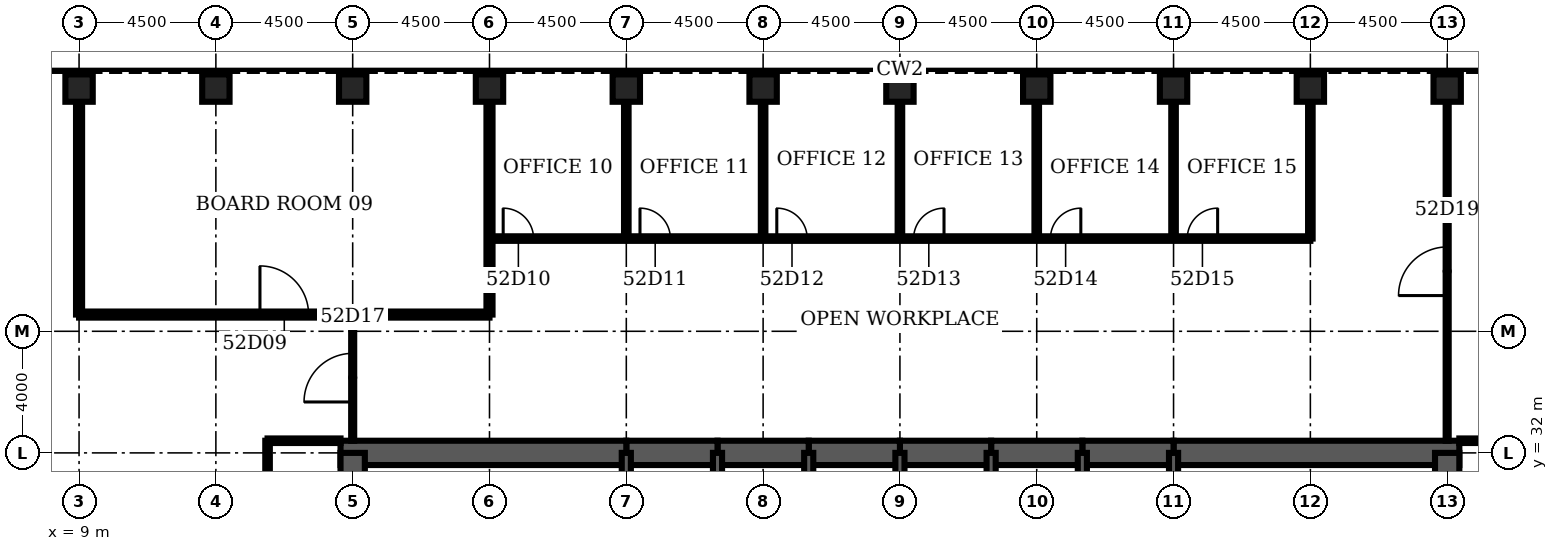
"""IFC4 building model, lengths in metres.
Left out: names, types, materials, properties, quantities, classifications, styles, units other than length and angle.
Written with IfcOpenShell. Run it as: python <this file> out.ifc"""

import sys

from ifc_helpers import new_model, si_unit, direction, frame, frame_2d, origin, origin_2d, place, context, subcontext, project, spatial, rectangle, hollow_rectangle, extrude, element, fill, save


model = new_model("IFC4")
c1 = context("Model", 3, precision=1e-05, world=origin(), true_north=direction((0.0, 1.0)))
c2 = subcontext(c1, "Body", "Model", "MODEL_VIEW")
j1 = project(units=[si_unit("LENGTHUNIT", "METRE"), si_unit("PLANEANGLEUNIT", "RADIAN")], contexts=[c1])
p1 = place(None, origin())
s1 = spatial("IfcSite", under=j1, at=p1, CompositionType="ELEMENT")
p2 = place(p1, origin())
s2 = spatial("IfcBuilding", under=s1, at=p2, CompositionType="ELEMENT")
p3 = place(p2, frame((0.0, 0.0, 232.0)))
s3 = spatial("IfcBuildingStorey", under=s2, at=p3, CompositionType="ELEMENT", Elevation=232.0)
for number, where, z_axis, x_axis in (
    (1, (54.0, 44.0, 0.0), (0.0, 0.0, 1.0), (0.0, 1.0, 0.0)),
    (2, (49.5, 44.0, 0.0), (0.0, 0.0, 1.0), (0.0, 1.0, 0.0)),
    (3, (45.0, 44.0, 0.0), (0.0, 0.0, 1.0), (0.0, 1.0, 0.0)),
    (4, (40.5, 44.0, 0.0), (0.0, 0.0, 1.0), (0.0, 1.0, 0.0)),
    (5, (36.0, 44.0, 0.0), (0.0, 0.0, 1.0), (0.0, 1.0, 0.0)),
    (6, (31.5, 44.0, 0.0), (0.0, 0.0, 1.0), (0.0, 1.0, 0.0)),
    (7, (27.0, 44.0, 0.0), (0.0, 0.0, 1.0), (0.0, 1.0, 0.0)),
    (8, (22.5, 44.0, 0.0), (0.0, 0.0, 1.0), (0.0, 1.0, 0.0)),
    (9, (18.0, 44.0, 0.0), (0.0, 0.0, 1.0), (0.0, 1.0, 0.0)),
    (10, (13.5, 44.0, 0.0), (0.0, 0.0, 1.0), (0.0, 1.0, 0.0)),
    (11, (9.0, 44.0, 0.0), (0.0, 0.0, 1.0), (0.0, 1.0, 0.0)),
):
    element("IfcColumn", number, at=place(p3, frame(where, z_axis=z_axis, x_axis=x_axis)), inside=s3, PredefinedType="COLUMN", context=c2, shape_type="SweptSolid", body=[
        extrude(hollow_rectangle(XDim=0.9, YDim=0.9, WallThickness=0.08, at=origin_2d()), origin(), (0.0, 0.0, 1.0), 4.2),
    ])
p4 = place(p3, frame((54.4, 32.0, 0.0), z_axis=(0.0, 0.0, 1.0), x_axis=(-1.0, 0.0, 0.0)))
e12 = element("IfcWall", 12, at=p4, inside=s3, PredefinedType="SHEAR", context=c2, shape_type="SweptSolid", body=[
    extrude(rectangle(XDim=9.4, YDim=0.8, at=frame_2d((4.7, 0.0))), origin(), (0.0, 0.0, 1.0), 4.2),
])
for number, where, z_axis, x_axis in (
    (13, (45.0, 32.0, 0.0), (0.0, 0.0, 1.0), (-1.0, 0.0, 0.0)),
    (14, (42.0, 32.0, 0.0), (0.0, 0.0, 1.0), (-1.0, 0.0, 0.0)),
    (15, (39.0, 32.0, 0.0), (0.0, 0.0, 1.0), (-1.0, 0.0, 0.0)),
    (16, (36.0, 32.0, 0.0), (0.0, 0.0, 1.0), (-1.0, 0.0, 0.0)),
    (17, (33.0, 32.0, 0.0), (0.0, 0.0, 1.0), (-1.0, 0.0, 0.0)),
    (18, (30.0, 32.0, 0.0), (0.0, 0.0, 1.0), (-1.0, 0.0, 0.0)),
):
    element("IfcWall", number, at=place(p3, frame(where, z_axis=z_axis, x_axis=x_axis)), inside=s3, PredefinedType="SHEAR", context=c2, shape_type="SweptSolid", body=[
        extrude(rectangle(XDim=3.0, YDim=0.8, at=frame_2d((1.5, 0.0))), origin(), (0.0, 0.0, 1.0), 4.2),
    ])
p5 = place(p3, frame((27.0, 32.0, 0.0), z_axis=(0.0, 0.0, 1.0), x_axis=(-1.0, 0.0, 0.0)))
e19 = element("IfcWall", 19, at=p5, inside=s3, PredefinedType="SHEAR", context=c2, shape_type="SweptSolid", body=[
    extrude(rectangle(XDim=9.4, YDim=0.8, at=frame_2d((4.7, 0.0))), origin(), (0.0, 0.0, 1.0), 4.2),
])
for number, where, z_axis, x_axis in (
    (20, (18.0, 32.0, 0.0), (0.0, 0.0, 1.0), (0.0, -1.0, 0.0)),
    (21, (54.0, 28.8, 0.0), (0.0, 0.0, 1.0), (0.0, 1.0, 0.0)),
):
    element("IfcWall", number, at=place(p3, frame(where, z_axis=z_axis, x_axis=x_axis)), inside=s3, PredefinedType="SHEAR", context=c2, shape_type="SweptSolid", body=[
        extrude(rectangle(XDim=3.2, YDim=0.8, at=frame_2d((1.6, 0.0))), origin(), (0.0, 0.0, 1.0), 4.2),
    ])
for number, where, z_axis, x_axis in (
    (22, (27.0, 28.8, 0.0), (0.0, 0.0, 1.0), (0.0, 1.0, 0.0)),
    (23, (30.0, 28.8, 0.0), (0.0, 0.0, 1.0), (0.0, 1.0, 0.0)),
    (24, (33.0, 28.8, 0.0), (0.0, 0.0, 1.0), (0.0, 1.0, 0.0)),
    (25, (36.0, 28.8, 0.0), (0.0, 0.0, 1.0), (0.0, 1.0, 0.0)),
    (26, (39.0, 28.8, 0.0), (0.0, 0.0, 1.0), (0.0, 1.0, 0.0)),
    (27, (42.0, 28.8, 0.0), (0.0, 0.0, 1.0), (0.0, 1.0, 0.0)),
    (28, (45.0, 28.8, 0.0), (0.0, 0.0, 1.0), (0.0, 1.0, 0.0)),
):
    element("IfcWall", number, at=place(p3, frame(where, z_axis=z_axis, x_axis=x_axis)), inside=s3, PredefinedType="SOLIDWALL", context=c2, shape_type="SweptSolid", body=[
        extrude(rectangle(XDim=3.2, YDim=0.3, at=frame_2d((1.6, 0.0))), origin(), (0.0, 0.0, 1.0), 4.2),
    ])
for number, where, z_axis, x_axis in (
    (29, (15.2, 32.4, 0.0), (0.0, 0.0, 1.0), (1.0, 0.0, 0.0)),
    (30, (54.4, 32.4, 0.0), (0.0, 0.0, 1.0), (1.0, 0.0, 0.0)),
):
    element("IfcWall", number, at=place(p3, frame(where, z_axis=z_axis, x_axis=x_axis)), inside=s3, PredefinedType="PARTITIONING", context=c2, shape_type="SweptSolid", body=[
        extrude(rectangle(XDim=2.4, YDim=0.15, at=frame_2d((1.2, 0.0))), origin(), (0.0, 0.0, 1.0), 3.0),
    ])
p6 = place(p3, frame((9.0, 36.55, 0.0), z_axis=(0.0, 0.0, 1.0), x_axis=(1.0, 0.0, 0.0)))
e31 = element("IfcWall", 31, at=p6, inside=s3, PredefinedType="PARTITIONING", context=c2, shape_type="SweptSolid", body=[
    extrude(rectangle(XDim=13.5, YDim=0.2, at=frame_2d((6.75, 0.0))), origin(), (0.0, 0.0, 1.0), 3.0),
])
p7 = place(p6, frame((5.95, 0.0, 0.0)))
e32 = element("IfcOpeningElement", 32, at=p7, cuts=e31, PredefinedType="OPENING", context=c2, shape_type="SweptSolid", body=[
    extrude(rectangle(XDim=1.6, YDim=2.1, at=frame_2d((0.8, 1.05))), frame((0.0, 0.11, 0.0), z_axis=(0.0, -1.0, 0.0), x_axis=(1.0, 0.0, 0.0)), (0.0, 0.0, 1.0), 0.22),
])
p8 = place(p3, frame((22.5, 39.05, 0.0), z_axis=(0.0, 0.0, 1.0), x_axis=(1.0, 0.0, 0.0)))
e33 = element("IfcWall", 33, at=p8, inside=s3, PredefinedType="PARTITIONING", context=c2, shape_type="SweptSolid", body=[
    extrude(rectangle(XDim=27.0, YDim=0.15, at=frame_2d((13.5, 0.0))), origin(), (0.0, 0.0, 1.0), 3.0),
])
p9 = place(p8, frame((0.45, 0.0, 0.0)))
e34 = element("IfcOpeningElement", 34, at=p9, cuts=e33, PredefinedType="OPENING", context=c2, shape_type="SweptSolid", body=[
    extrude(rectangle(XDim=1.0, YDim=2.1, at=frame_2d((0.5, 1.05))), frame((0.0, 0.085, 0.0), z_axis=(0.0, -1.0, 0.0), x_axis=(1.0, 0.0, 0.0)), (0.0, 0.0, 1.0), 0.17),
])
p10 = place(p8, frame((4.95, 0.0, 0.0)))
e35 = element("IfcOpeningElement", 35, at=p10, cuts=e33, PredefinedType="OPENING", context=c2, shape_type="SweptSolid", body=[
    extrude(rectangle(XDim=1.0, YDim=2.1, at=frame_2d((0.5, 1.05))), frame((0.0, 0.085, 0.0), z_axis=(0.0, -1.0, 0.0), x_axis=(1.0, 0.0, 0.0)), (0.0, 0.0, 1.0), 0.17),
])
p11 = place(p8, frame((9.45, 0.0, 0.0)))
e36 = element("IfcOpeningElement", 36, at=p11, cuts=e33, PredefinedType="OPENING", context=c2, shape_type="SweptSolid", body=[
    extrude(rectangle(XDim=1.0, YDim=2.1, at=frame_2d((0.5, 1.05))), frame((0.0, 0.085, 0.0), z_axis=(0.0, -1.0, 0.0), x_axis=(1.0, 0.0, 0.0)), (0.0, 0.0, 1.0), 0.17),
])
p12 = place(p8, frame((13.95, 0.0, 0.0)))
e37 = element("IfcOpeningElement", 37, at=p12, cuts=e33, PredefinedType="OPENING", context=c2, shape_type="SweptSolid", body=[
    extrude(rectangle(XDim=1.0, YDim=2.1, at=frame_2d((0.5, 1.05))), frame((0.0, 0.085, 0.0), z_axis=(0.0, -1.0, 0.0), x_axis=(1.0, 0.0, 0.0)), (0.0, 0.0, 1.0), 0.17),
])
p13 = place(p8, frame((18.45, 0.0, 0.0)))
e38 = element("IfcOpeningElement", 38, at=p13, cuts=e33, PredefinedType="OPENING", context=c2, shape_type="SweptSolid", body=[
    extrude(rectangle(XDim=1.0, YDim=2.1, at=frame_2d((0.5, 1.05))), frame((0.0, 0.085, 0.0), z_axis=(0.0, -1.0, 0.0), x_axis=(1.0, 0.0, 0.0)), (0.0, 0.0, 1.0), 0.17),
])
p14 = place(p8, frame((22.95, 0.0, 0.0)))
e39 = element("IfcOpeningElement", 39, at=p14, cuts=e33, PredefinedType="OPENING", context=c2, shape_type="SweptSolid", body=[
    extrude(rectangle(XDim=1.0, YDim=2.1, at=frame_2d((0.5, 1.05))), frame((0.0, 0.085, 0.0), z_axis=(0.0, -1.0, 0.0), x_axis=(1.0, 0.0, 0.0)), (0.0, 0.0, 1.0), 0.17),
])
p15 = place(p3, frame((9.0, 36.55, 0.0), z_axis=(0.0, 0.0, 1.0), x_axis=(0.0, 1.0, 0.0)))
e40 = element("IfcWall", 40, at=p15, inside=s3, PredefinedType="PARTITIONING", context=c2, shape_type="SweptSolid", body=[
    extrude(rectangle(XDim=7.0, YDim=0.2, at=frame_2d((3.5, 0.0))), origin(), (0.0, 0.0, 1.0), 3.0),
])
p16 = place(p3, frame((15.2, 13.8, 0.0), z_axis=(0.0, 0.0, 1.0), x_axis=(0.0, 1.0, 0.0)))
e41 = element("IfcWall", 41, at=p16, inside=s3, PredefinedType="PARTITIONING", context=c2, shape_type="SweptSolid", body=[
    extrude(rectangle(XDim=18.6, YDim=0.15, at=frame_2d((9.3, 0.0))), origin(), (0.0, 0.0, 1.0), 3.0),
])
p17 = place(p16, frame((8.7, 0.0, 0.0)))
e42 = element("IfcOpeningElement", 42, at=p17, cuts=e41, PredefinedType="OPENING", context=c2, shape_type="SweptSolid", body=[
    extrude(rectangle(XDim=1.2, YDim=2.1, at=frame_2d((0.6, 1.05))), frame((0.0, 0.085, 0.0), z_axis=(0.0, -1.0, 0.0), x_axis=(1.0, 0.0, 0.0)), (0.0, 0.0, 1.0), 0.17),
])
p18 = place(p3, frame((18.0, 32.4, 0.0), z_axis=(0.0, 0.0, 1.0), x_axis=(0.0, 1.0, 0.0)))
e43 = element("IfcWall", 43, at=p18, inside=s3, PredefinedType="PARTITIONING", context=c2, shape_type="SweptSolid", body=[
    extrude(rectangle(XDim=4.15, YDim=0.1, at=frame_2d((2.075, 0.0))), origin(), (0.0, 0.0, 1.0), 3.0),
])
p19 = place(p18, frame((1.275, 0.0, 0.0)))
e44 = element("IfcOpeningElement", 44, at=p19, cuts=e43, PredefinedType="OPENING", context=c2, shape_type="SweptSolid", body=[
    extrude(rectangle(XDim=1.6, YDim=2.1, at=frame_2d((0.8, 1.05))), frame((0.0, 0.06, 0.0), z_axis=(0.0, -1.0, 0.0), x_axis=(1.0, 0.0, 0.0)), (0.0, 0.0, 1.0), 0.12),
])
p20 = place(p3, frame((22.5, 36.55, 0.0), z_axis=(0.0, 0.0, 1.0), x_axis=(0.0, 1.0, 0.0)))
e45 = element("IfcWall", 45, at=p20, inside=s3, PredefinedType="PARTITIONING", context=c2, shape_type="SweptSolid", body=[
    extrude(rectangle(XDim=7.0, YDim=0.2, at=frame_2d((3.5, 0.0))), origin(), (0.0, 0.0, 1.0), 3.0),
])
for number, where, z_axis, x_axis in (
    (46, (27.0, 39.05, 0.0), (0.0, 0.0, 1.0), (0.0, 1.0, 0.0)),
    (47, (31.5, 39.05, 0.0), (0.0, 0.0, 1.0), (0.0, 1.0, 0.0)),
    (48, (36.0, 39.05, 0.0), (0.0, 0.0, 1.0), (0.0, 1.0, 0.0)),
    (49, (40.5, 39.05, 0.0), (0.0, 0.0, 1.0), (0.0, 1.0, 0.0)),
    (50, (45.0, 39.05, 0.0), (0.0, 0.0, 1.0), (0.0, 1.0, 0.0)),
    (51, (49.5, 39.05, 0.0), (0.0, 0.0, 1.0), (0.0, 1.0, 0.0)),
):
    element("IfcWall", number, at=place(p3, frame(where, z_axis=z_axis, x_axis=x_axis)), inside=s3, PredefinedType="PARTITIONING", context=c2, shape_type="SweptSolid", body=[
        extrude(rectangle(XDim=4.5, YDim=0.15, at=frame_2d((2.25, 0.0))), origin(), (0.0, 0.0, 1.0), 3.0),
    ])
p21 = place(p3, frame((54.0, 32.4, 0.0), z_axis=(0.0, 0.0, 1.0), x_axis=(0.0, 1.0, 0.0)))
e52 = element("IfcWall", 52, at=p21, inside=s3, PredefinedType="PARTITIONING", context=c2, shape_type="SweptSolid", body=[
    extrude(rectangle(XDim=11.15, YDim=0.1, at=frame_2d((5.575, 0.0))), origin(), (0.0, 0.0, 1.0), 3.0),
])
p22 = place(p21, frame((4.775, 0.0, 0.0)))
e53 = element("IfcOpeningElement", 53, at=p22, cuts=e52, PredefinedType="OPENING", context=c2, shape_type="SweptSolid", body=[
    extrude(rectangle(XDim=1.6, YDim=2.1, at=frame_2d((0.8, 1.05))), frame((0.0, 0.06, 0.0), z_axis=(0.0, -1.0, 0.0), x_axis=(1.0, 0.0, 0.0)), (0.0, 0.0, 1.0), 0.12),
])
p23 = place(p7, origin())
e54 = element("IfcDoor", 54, at=p23, inside=s3, OperationType="SINGLE_SWING_LEFT", PredefinedType="DOOR", context=c2, shape_type="SweptSolid", body=[
    extrude(rectangle(XDim=1.6, YDim=2.1, at=frame_2d((0.8, 1.05))), frame((0.0, 0.025, 0.0), z_axis=(0.0, -1.0, 0.0), x_axis=(1.0, 0.0, 0.0)), (0.0, 0.0, 1.0), 0.05),
])
fill(e32, e54)
p24 = place(p9, origin())
e55 = element("IfcDoor", 55, at=p24, inside=s3, OperationType="SINGLE_SWING_LEFT", PredefinedType="DOOR", context=c2, shape_type="SweptSolid", body=[
    extrude(rectangle(XDim=1.0, YDim=2.1, at=frame_2d((0.5, 1.05))), frame((0.0, 0.025, 0.0), z_axis=(0.0, -1.0, 0.0), x_axis=(1.0, 0.0, 0.0)), (0.0, 0.0, 1.0), 0.05),
])
fill(e34, e55)
p25 = place(p10, origin())
e56 = element("IfcDoor", 56, at=p25, inside=s3, OperationType="SINGLE_SWING_LEFT", PredefinedType="DOOR", context=c2, shape_type="SweptSolid", body=[
    extrude(rectangle(XDim=1.0, YDim=2.1, at=frame_2d((0.5, 1.05))), frame((0.0, 0.025, 0.0), z_axis=(0.0, -1.0, 0.0), x_axis=(1.0, 0.0, 0.0)), (0.0, 0.0, 1.0), 0.05),
])
fill(e35, e56)
p26 = place(p11, origin())
e57 = element("IfcDoor", 57, at=p26, inside=s3, OperationType="SINGLE_SWING_LEFT", PredefinedType="DOOR", context=c2, shape_type="SweptSolid", body=[
    extrude(rectangle(XDim=1.0, YDim=2.1, at=frame_2d((0.5, 1.05))), frame((0.0, 0.025, 0.0), z_axis=(0.0, -1.0, 0.0), x_axis=(1.0, 0.0, 0.0)), (0.0, 0.0, 1.0), 0.05),
])
fill(e36, e57)
p27 = place(p12, origin())
e58 = element("IfcDoor", 58, at=p27, inside=s3, OperationType="SINGLE_SWING_RIGHT", PredefinedType="DOOR", context=c2, shape_type="SweptSolid", body=[
    extrude(rectangle(XDim=1.0, YDim=2.1, at=frame_2d((0.5, 1.05))), frame((0.0, 0.025, 0.0), z_axis=(0.0, -1.0, 0.0), x_axis=(1.0, 0.0, 0.0)), (0.0, 0.0, 1.0), 0.05),
])
fill(e37, e58)
p28 = place(p13, origin())
e59 = element("IfcDoor", 59, at=p28, inside=s3, OperationType="SINGLE_SWING_RIGHT", PredefinedType="DOOR", context=c2, shape_type="SweptSolid", body=[
    extrude(rectangle(XDim=1.0, YDim=2.1, at=frame_2d((0.5, 1.05))), frame((0.0, 0.025, 0.0), z_axis=(0.0, -1.0, 0.0), x_axis=(1.0, 0.0, 0.0)), (0.0, 0.0, 1.0), 0.05),
])
fill(e38, e59)
p29 = place(p14, origin())
e60 = element("IfcDoor", 60, at=p29, inside=s3, OperationType="SINGLE_SWING_RIGHT", PredefinedType="DOOR", context=c2, shape_type="SweptSolid", body=[
    extrude(rectangle(XDim=1.0, YDim=2.1, at=frame_2d((0.5, 1.05))), frame((0.0, 0.025, 0.0), z_axis=(0.0, -1.0, 0.0), x_axis=(1.0, 0.0, 0.0)), (0.0, 0.0, 1.0), 0.05),
])
fill(e39, e60)
p30 = place(p19, origin())
e61 = element("IfcDoor", 61, at=p30, inside=s3, OperationType="SINGLE_SWING_LEFT", PredefinedType="DOOR", context=c2, shape_type="SweptSolid", body=[
    extrude(rectangle(XDim=1.6, YDim=2.1, at=frame_2d((0.8, 1.05))), frame((0.0, 0.025, 0.0), z_axis=(0.0, -1.0, 0.0), x_axis=(1.0, 0.0, 0.0)), (0.0, 0.0, 1.0), 0.05),
])
fill(e44, e61)
p31 = place(p22, origin())
e62 = element("IfcDoor", 62, at=p31, inside=s3, OperationType="SINGLE_SWING_LEFT", PredefinedType="DOOR", context=c2, shape_type="SweptSolid", body=[
    extrude(rectangle(XDim=1.6, YDim=2.1, at=frame_2d((0.8, 1.05))), frame((0.0, 0.025, 0.0), z_axis=(0.0, -1.0, 0.0), x_axis=(1.0, 0.0, 0.0)), (0.0, 0.0, 1.0), 0.05),
])
fill(e53, e62)
save(model, sys.argv[1])
